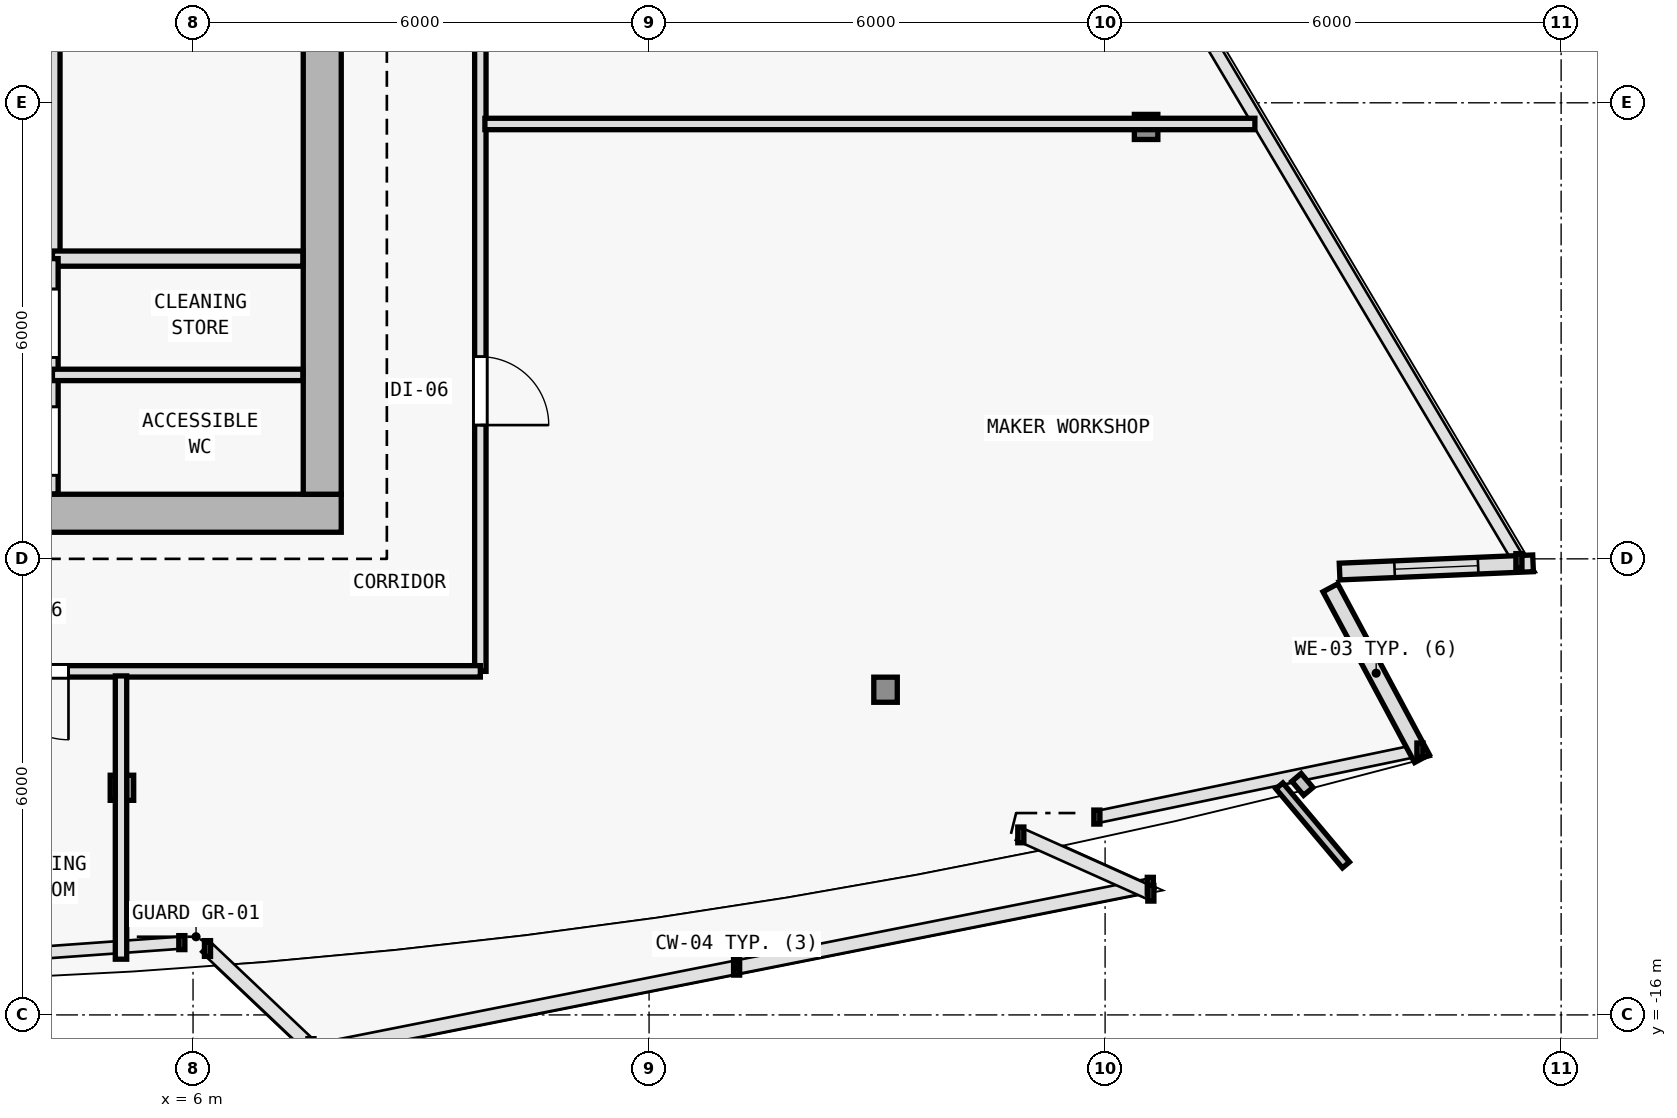
"""IFC4 building model, lengths in metres.
Left out: names, types, materials, properties, quantities, classifications, styles, units other than length and angle.
Written with IfcOpenShell. Run it as: python <this file> out.ifc"""

import sys

from ifc_helpers import new_model, si_unit, direction, frame, frame_2d, origin, origin_2d, place, context, subcontext, project, spatial, rectangle, i_section, extrude, element, fill, save


model = new_model("IFC4")
c1 = context("Model", 3, precision=1e-05, world=origin(), true_north=direction((0.0, 1.0)))
c2 = subcontext(c1, "Body", "Model", "MODEL_VIEW")
j1 = project(units=[si_unit("LENGTHUNIT", "METRE"), si_unit("PLANEANGLEUNIT", "RADIAN")], contexts=[c1])
p1 = place(None, origin())
s1 = spatial("IfcSite", under=j1, at=p1, CompositionType="ELEMENT")
p2 = place(p1, origin())
s2 = spatial("IfcBuilding", under=s1, at=p2, CompositionType="ELEMENT")
p3 = place(p2, frame((0.0, 0.0, 290.4)))
s3 = spatial("IfcBuildingStorey", under=s2, at=p3, CompositionType="ELEMENT", Elevation=290.4)
p4 = place(p3, frame((7.7, -9.4, 0.0), z_axis=(0.0, 0.0, 1.0), x_axis=(1.0, 0.0, 0.0)))
e1 = element("IfcColumn", 1, at=p4, inside=s3, PredefinedType="COLUMN", context=c2, shape_type="SweptSolid", body=[
    extrude(i_section(OverallWidth=0.374, OverallDepth=0.372, WebThickness=0.012, FlangeThickness=0.02, FilletRadius=0.015, at=origin_2d()), origin(), (0.0, 0.0, 1.0), 3.6),
])
p5 = place(p3, frame((5.065, -13.012, 0.006), z_axis=(-0.006934288159, 0.035283289748, 0.999353293441), x_axis=(-0.981229659911, -0.192842823335, 0.0)))
e2 = element("IfcColumn", 2, at=p5, inside=s3, PredefinedType="COLUMN", context=c2, shape_type="SweptSolid", body=[
    extrude(i_section(OverallWidth=0.309, OverallDepth=0.33, WebThickness=0.011, FlangeThickness=0.019, FilletRadius=0.027, at=origin_2d()), origin(), (0.0, 0.0, 1.0), 3.591),
])
p6 = place(p3, frame((15.111, -11.722, 0.006), z_axis=(-0.020596339702, 0.033443561496, 0.99922836178), x_axis=(-0.851480003019, -0.52438707503, 0.0)))
e3 = element("IfcColumn", 3, at=p6, inside=s3, PredefinedType="COLUMN", context=c2, shape_type="SweptSolid", body=[
    extrude(i_section(OverallWidth=0.309, OverallDepth=0.33, WebThickness=0.011, FlangeThickness=0.019, FilletRadius=0.027, at=origin_2d()), origin(), (0.0, 0.0, 1.0), 3.592),
])
p7 = place(p3, frame((18.539, -4.318, 0.006), z_axis=(-0.026039494941, 0.021620259507, 0.999427090428), x_axis=(-0.638800249892, -0.769372628015, 0.0)))
e4 = element("IfcColumn", 4, at=p7, inside=s3, PredefinedType="COLUMN", context=c2, shape_type="SweptSolid", body=[
    extrude(i_section(OverallWidth=0.309, OverallDepth=0.33, WebThickness=0.011, FlangeThickness=0.019, FilletRadius=0.027, at=origin_2d()), origin(), (0.0, 0.0, 1.0), 3.591),
])
p8 = place(p3, frame((20.964, -10.381, 0.0), z_axis=(0.0, 0.0, 1.0), x_axis=(0.472728849632, -0.881207940685, 0.0)))
e5 = element("IfcWall", 5, at=p8, inside=s3, PredefinedType="SOLIDWALL", context=c2, shape_type="SweptSolid", body=[
    extrude(rectangle(XDim=2.55, YDim=0.22, at=frame_2d((1.275, 0.0))), origin(), (0.0, 0.0, 1.0), 3.15),
])
p9 = place(p3, frame((23.631, -10.059, 0.0), z_axis=(0.0, 0.0, 1.0), x_axis=(-0.999098350703, -0.042455690107, 0.0)))
e6 = element("IfcWall", 6, at=p9, inside=s3, PredefinedType="SOLIDWALL", context=c2, shape_type="SweptSolid", body=[
    extrude(rectangle(XDim=2.547, YDim=0.22, at=frame_2d((1.274, 0.0))), origin(), (0.0, 0.0, 1.0), 3.15),
])
p10 = place(p9, frame((0.724, 0.0, 0.62)))
e7 = element("IfcOpeningElement", 7, at=p10, cuts=e6, PredefinedType="OPENING", context=c2, shape_type="SweptSolid", body=[
    extrude(rectangle(XDim=1.1, YDim=1.8, at=frame_2d((0.55, 0.9))), frame((0.0, 0.12, 0.0), z_axis=(0.0, -1.0, 0.0), x_axis=(1.0, 0.0, 0.0)), (0.0, 0.0, 1.0), 0.24),
])
p11 = place(p3, frame((-7.95, -9.4, 0.0), z_axis=(0.0, 0.0, 1.0), x_axis=(1.0, 0.0, 0.0)))
e8 = element("IfcWall", 8, at=p11, inside=s3, PredefinedType="SHEAR", context=c2, shape_type="SweptSolid", body=[
    extrude(rectangle(XDim=15.9, YDim=0.5, at=frame_2d((7.95, 0.0))), origin(), (0.0, 0.0, 1.0), 3.15),
])
p12 = place(p11, frame((9.6, 0.0, 0.0)))
e9 = element("IfcOpeningElement", 9, at=p12, cuts=e8, PredefinedType="OPENING", context=c2, shape_type="SweptSolid", body=[
    extrude(rectangle(XDim=1.5, YDim=2.2, at=frame_2d((0.75, 1.1))), frame((0.0, 0.26, 0.0), z_axis=(0.0, -1.0, 0.0), x_axis=(1.0, 0.0, 0.0)), (0.0, 0.0, 1.0), 0.52),
])
p13 = place(p3, frame((7.7, 9.95, 0.0), z_axis=(0.0, 0.0, 1.0), x_axis=(0.0, -1.0, 0.0)))
e10 = element("IfcWall", 10, at=p13, inside=s3, PredefinedType="SHEAR", context=c2, shape_type="SweptSolid", body=[
    extrude(rectangle(XDim=19.1, YDim=0.5, at=frame_2d((9.55, 0.0))), origin(), (0.0, 0.0, 1.0), 3.15),
])
p14 = place(p3, frame((4.15, -6.05, 0.0), z_axis=(0.0, 0.0, 1.0), x_axis=(0.0, 1.0, 0.0)))
e11 = element("IfcWall", 11, at=p14, inside=s3, PredefinedType="SOLIDWALL", context=c2, shape_type="SweptSolid", body=[
    extrude(rectangle(XDim=8.7, YDim=0.2, at=frame_2d((4.35, 0.0))), origin(), (0.0, 0.0, 1.0), 3.15),
])
p15 = place(p14, frame((3.6, 0.0, 0.0)))
e12 = element("IfcOpeningElement", 12, at=p15, cuts=e11, PredefinedType="OPENING", context=c2, shape_type="SweptSolid", body=[
    extrude(rectangle(XDim=0.95, YDim=2.1, at=frame_2d((0.475, 1.05))), frame((0.0, 0.11, 0.0), z_axis=(0.0, -1.0, 0.0), x_axis=(1.0, 0.0, 0.0)), (0.0, 0.0, 1.0), 0.22),
])
p16 = place(p3, frame((4.15, -6.05, 0.0), z_axis=(0.0, 0.0, 1.0), x_axis=(1.0, 0.0, 0.0)))
e13 = element("IfcWall", 13, at=p16, inside=s3, PredefinedType="SOLIDWALL", context=c2, shape_type="SweptSolid", body=[
    extrude(rectangle(XDim=3.295, YDim=0.2, at=frame_2d((1.647, 0.0))), origin(), (0.0, 0.0, 1.0), 3.15),
])
p17 = place(p3, frame((4.15, -9.145, 0.0), z_axis=(0.0, 0.0, 1.0), x_axis=(0.0, 1.0, 0.0)))
e14 = element("IfcWall", 14, at=p17, inside=s3, PredefinedType="PARTITIONING", context=c2, shape_type="SweptSolid", body=[
    extrude(rectangle(XDim=3.095, YDim=0.15, at=frame_2d((1.547, 0.0))), origin(), (0.0, 0.0, 1.0), 3.15),
])
p18 = place(p17, frame((0.245, 0.0, 0.0)))
e15 = element("IfcOpeningElement", 15, at=p18, cuts=e14, PredefinedType="OPENING", context=c2, shape_type="SweptSolid", body=[
    extrude(rectangle(XDim=0.9, YDim=2.1, at=frame_2d((0.45, 1.05))), frame((0.0, 0.085, 0.0), z_axis=(0.0, -1.0, 0.0), x_axis=(1.0, 0.0, 0.0)), (0.0, 0.0, 1.0), 0.17),
])
p19 = place(p17, frame((1.795, 0.0, 0.0)))
e16 = element("IfcOpeningElement", 16, at=p19, cuts=e14, PredefinedType="OPENING", context=c2, shape_type="SweptSolid", body=[
    extrude(rectangle(XDim=0.9, YDim=2.1, at=frame_2d((0.45, 1.05))), frame((0.0, 0.085, 0.0), z_axis=(0.0, -1.0, 0.0), x_axis=(1.0, 0.0, 0.0)), (0.0, 0.0, 1.0), 0.17),
])
p20 = place(p3, frame((4.15, -7.58, 0.0), z_axis=(0.0, 0.0, 1.0), x_axis=(1.0, 0.0, 0.0)))
e17 = element("IfcWall", 17, at=p20, inside=s3, PredefinedType="PARTITIONING", context=c2, shape_type="SweptSolid", body=[
    extrude(rectangle(XDim=3.295, YDim=0.15, at=frame_2d((1.647, 0.0))), origin(), (0.0, 0.0, 1.0), 3.15),
])
p21 = place(p3, frame((9.78, 8.226, 0.0), z_axis=(0.0, 0.0, 1.0), x_axis=(0.0, -1.0, 0.0)))
e18 = element("IfcWall", 18, at=p21, inside=s3, PredefinedType="PARTITIONING", context=c2, shape_type="SweptSolid", body=[
    extrude(rectangle(XDim=19.706, YDim=0.15, at=frame_2d((9.853, 0.0))), origin(), (0.0, 0.0, 1.0), 2.525),
])
p22 = place(p21, frame((15.566, 0.0, 0.0)))
e19 = element("IfcOpeningElement", 19, at=p22, cuts=e18, PredefinedType="OPENING", context=c2, shape_type="SweptSolid", body=[
    extrude(rectangle(XDim=0.9, YDim=2.1, at=frame_2d((0.45, 1.05))), frame((0.0, 0.085, 0.0), z_axis=(0.0, -1.0, 0.0), x_axis=(1.0, 0.0, 0.0)), (0.0, 0.0, 1.0), 0.17),
])
p23 = place(p21, frame((8.948, 0.0, 0.0)))
e20 = element("IfcOpeningElement", 20, at=p23, cuts=e18, PredefinedType="OPENING", context=c2, shape_type="SweptSolid", body=[
    extrude(rectangle(XDim=0.9, YDim=2.1, at=frame_2d((0.45, 1.05))), frame((0.0, 0.085, 0.0), z_axis=(0.0, -1.0, 0.0), x_axis=(1.0, 0.0, 0.0)), (0.0, 0.0, 1.0), 0.17),
])
p24 = place(p21, frame((2.785, 0.0, 0.0)))
e21 = element("IfcOpeningElement", 21, at=p24, cuts=e18, PredefinedType="OPENING", context=c2, shape_type="SweptSolid", body=[
    extrude(rectangle(XDim=0.9, YDim=2.1, at=frame_2d((0.45, 1.05))), frame((0.0, 0.085, 0.0), z_axis=(0.0, -1.0, 0.0), x_axis=(1.0, 0.0, 0.0)), (0.0, 0.0, 1.0), 0.17),
])
p25 = place(p3, frame((9.78, -11.48, 0.0), z_axis=(0.0, 0.0, 1.0), x_axis=(-1.0, 0.0, 0.0)))
e22 = element("IfcWall", 22, at=p25, inside=s3, PredefinedType="PARTITIONING", context=c2, shape_type="SweptSolid", body=[
    extrude(rectangle(XDim=19.56, YDim=0.15, at=frame_2d((9.78, 0.0))), origin(), (0.0, 0.0, 1.0), 2.525),
])
p26 = place(p25, frame((16.657, 0.0, 0.0)))
e23 = element("IfcOpeningElement", 23, at=p26, cuts=e22, PredefinedType="OPENING", context=c2, shape_type="SweptSolid", body=[
    extrude(rectangle(XDim=0.9, YDim=2.1, at=frame_2d((0.45, 1.05))), frame((0.0, 0.085, 0.0), z_axis=(0.0, -1.0, 0.0), x_axis=(1.0, 0.0, 0.0)), (0.0, 0.0, 1.0), 0.17),
])
p27 = place(p25, frame((12.832, 0.0, 0.0)))
e24 = element("IfcOpeningElement", 24, at=p27, cuts=e22, PredefinedType="OPENING", context=c2, shape_type="SweptSolid", body=[
    extrude(rectangle(XDim=0.9, YDim=2.1, at=frame_2d((0.45, 1.05))), frame((0.0, 0.085, 0.0), z_axis=(0.0, -1.0, 0.0), x_axis=(1.0, 0.0, 0.0)), (0.0, 0.0, 1.0), 0.17),
])
p28 = place(p25, frame((10.225, 0.0, 0.0)))
e25 = element("IfcOpeningElement", 25, at=p28, cuts=e22, PredefinedType="OPENING", context=c2, shape_type="SweptSolid", body=[
    extrude(rectangle(XDim=0.9, YDim=2.1, at=frame_2d((0.45, 1.05))), frame((0.0, 0.085, 0.0), z_axis=(0.0, -1.0, 0.0), x_axis=(1.0, 0.0, 0.0)), (0.0, 0.0, 1.0), 0.17),
])
p29 = place(p25, frame((7.864, 0.0, 0.0)))
e26 = element("IfcOpeningElement", 26, at=p29, cuts=e22, PredefinedType="OPENING", context=c2, shape_type="SweptSolid", body=[
    extrude(rectangle(XDim=0.9, YDim=2.1, at=frame_2d((0.45, 1.05))), frame((0.0, 0.085, 0.0), z_axis=(0.0, -1.0, 0.0), x_axis=(1.0, 0.0, 0.0)), (0.0, 0.0, 1.0), 0.17),
])
p30 = place(p25, frame((5.419, 0.0, 0.0)))
e27 = element("IfcOpeningElement", 27, at=p30, cuts=e22, PredefinedType="OPENING", context=c2, shape_type="SweptSolid", body=[
    extrude(rectangle(XDim=0.9, YDim=2.1, at=frame_2d((0.45, 1.05))), frame((0.0, 0.085, 0.0), z_axis=(0.0, -1.0, 0.0), x_axis=(1.0, 0.0, 0.0)), (0.0, 0.0, 1.0), 0.17),
])
p31 = place(p3, frame((5.052, -11.54, 0.0), z_axis=(0.0, 0.0, 1.0), x_axis=(0.0, -1.0, 0.0)))
e28 = element("IfcWall", 28, at=p31, inside=s3, PredefinedType="PARTITIONING", context=c2, shape_type="SweptSolid", body=[
    extrude(rectangle(XDim=3.727, YDim=0.15, at=frame_2d((1.863, 0.0))), origin(), (0.0, 0.0, 1.0), 2.525),
])
p32 = place(p3, frame((9.84, -4.279, 0.0), z_axis=(0.0, 0.0, 1.0), x_axis=(1.0, 0.0, 0.0)))
e29 = element("IfcWall", 29, at=p32, inside=s3, PredefinedType="PARTITIONING", context=c2, shape_type="SweptSolid", body=[
    extrude(rectangle(XDim=10.131, YDim=0.15, at=frame_2d((5.065, 0.0))), origin(), (0.0, 0.0, 1.0), 2.625),
])
p33 = place(p10, origin())
e30 = element("IfcWindow", 30, at=p33, inside=s3, PartitioningType="SINGLE_PANEL", PredefinedType="WINDOW", context=c2, shape_type="SweptSolid", body=[
    extrude(rectangle(XDim=1.1, YDim=1.8, at=frame_2d((0.55, 0.9))), frame((0.0, 0.03, 0.0), z_axis=(0.0, -1.0, 0.0), x_axis=(1.0, 0.0, 0.0)), (0.0, 0.0, 1.0), 0.06),
])
fill(e7, e30)
p34 = place(p18, origin())
e31 = element("IfcDoor", 31, at=p34, inside=s3, OperationType="SINGLE_SWING_RIGHT", PredefinedType="DOOR", context=c2, shape_type="SweptSolid", body=[
    extrude(rectangle(XDim=0.9, YDim=2.1, at=frame_2d((0.45, 1.05))), frame((0.0, 0.025, 0.0), z_axis=(0.0, -1.0, 0.0), x_axis=(1.0, 0.0, 0.0)), (0.0, 0.0, 1.0), 0.05),
])
fill(e15, e31)
p35 = place(p19, origin())
e32 = element("IfcDoor", 32, at=p35, inside=s3, OperationType="SINGLE_SWING_LEFT", PredefinedType="DOOR", context=c2, shape_type="SweptSolid", body=[
    extrude(rectangle(XDim=0.9, YDim=2.1, at=frame_2d((0.45, 1.05))), frame((0.0, 0.025, 0.0), z_axis=(0.0, -1.0, 0.0), x_axis=(1.0, 0.0, 0.0)), (0.0, 0.0, 1.0), 0.05),
])
fill(e16, e32)
p36 = place(p30, origin())
e33 = element("IfcDoor", 33, at=p36, inside=s3, OperationType="SINGLE_SWING_LEFT", PredefinedType="DOOR", context=c2, shape_type="SweptSolid", body=[
    extrude(rectangle(XDim=0.9, YDim=2.1, at=frame_2d((0.45, 1.05))), frame((0.0, 0.025, 0.0), z_axis=(0.0, -1.0, 0.0), x_axis=(1.0, 0.0, 0.0)), (0.0, 0.0, 1.0), 0.05),
])
fill(e27, e33)
p37 = place(p22, origin())
e34 = element("IfcDoor", 34, at=p37, inside=s3, OperationType="SINGLE_SWING_RIGHT", PredefinedType="DOOR", context=c2, shape_type="SweptSolid", body=[
    extrude(rectangle(XDim=0.9, YDim=2.1, at=frame_2d((0.45, 1.05))), frame((0.0, 0.025, 0.0), z_axis=(0.0, -1.0, 0.0), x_axis=(1.0, 0.0, 0.0)), (0.0, 0.0, 1.0), 0.05),
])
fill(e19, e34)
save(model, sys.argv[1])
